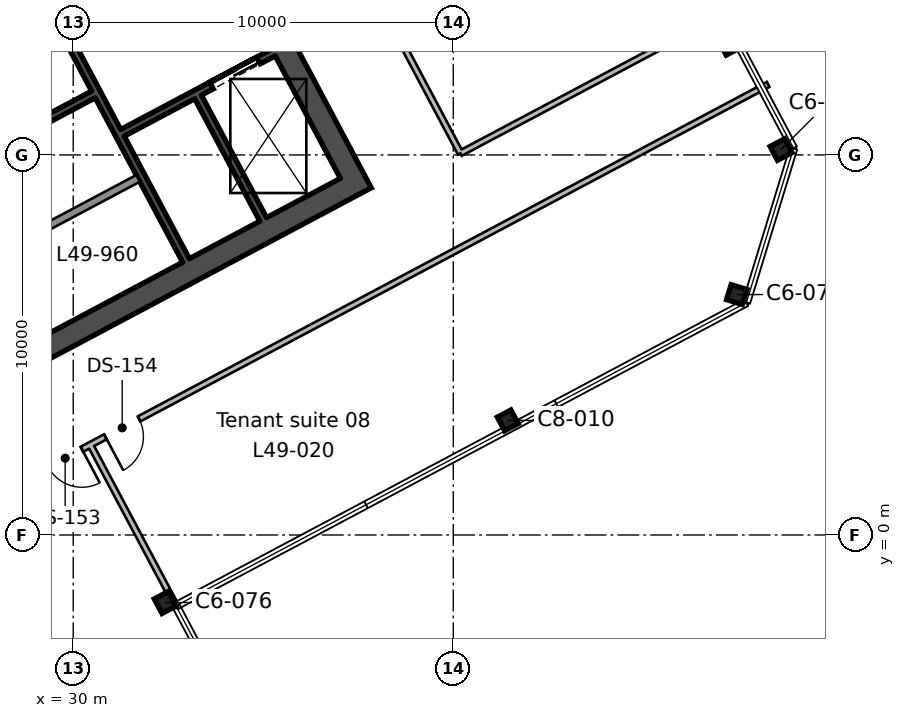
"""IFC4 building model, lengths in metres.
Left out: names, types, materials, properties, quantities, classifications, styles, units other than length and angle.
Written with IfcOpenShell. Run it as: python <this file> out.ifc"""

import sys

from ifc_helpers import new_model, si_unit, direction, frame, frame_2d, origin, origin_2d, place, context, subcontext, project, spatial, rectangle, i_section, extrude, element, fill, save


model = new_model("IFC4")
c1 = context("Model", 3, precision=1e-05, world=origin(), true_north=direction((0.0, 1.0)))
c2 = subcontext(c1, "Body", "Model", "MODEL_VIEW")
j1 = project(units=[si_unit("LENGTHUNIT", "METRE"), si_unit("PLANEANGLEUNIT", "RADIAN")], contexts=[c1])
p1 = place(None, origin())
s1 = spatial("IfcSite", under=j1, at=p1, CompositionType="ELEMENT")
p2 = place(p1, origin())
s2 = spatial("IfcBuilding", under=s1, at=p2, CompositionType="ELEMENT")
p3 = place(p2, frame((0.0, 0.0, 224.7)))
s3 = spatial("IfcBuildingStorey", under=s2, at=p3, CompositionType="ELEMENT", Elevation=224.7)
p4 = place(p3, frame((32.417, -1.777, 0.0), z_axis=(0.0, 0.0, 1.0), x_axis=(0.882947592859, 0.469471562786, 0.0)))
e1 = element("IfcColumn", 1, at=p4, inside=s3, PredefinedType="COLUMN", context=c2, shape_type="SweptSolid", body=[
    extrude(i_section(OverallWidth=0.412, OverallDepth=0.434, WebThickness=0.036, FlangeThickness=0.057, FilletRadius=0.015, at=origin_2d()), origin(), (0.0, 0.0, 1.0), 3.9),
])
p5 = place(p3, frame((41.434, 3.015, 0.0), z_axis=(0.0, 0.0, 1.0), x_axis=(0.882947592859, 0.469471562786, 0.0)))
e2 = element("IfcColumn", 2, at=p5, inside=s3, PredefinedType="COLUMN", context=c2, shape_type="SweptSolid", body=[
    extrude(i_section(OverallWidth=0.404, OverallDepth=0.406, WebThickness=0.027, FlangeThickness=0.044, FilletRadius=0.015, at=origin_2d()), origin(), (0.0, 0.0, 1.0), 3.9),
])
for number, where, z_axis, x_axis in (
    (3, (47.459, 6.326, 0.0), (0.0, 0.0, 1.0), (0.292, 0.956, 0.0)),
    (4, (48.626, 10.142, 0.0), (0.0, 0.0, 1.0), (-0.469, 0.883, 0.0)),
):
    element("IfcColumn", number, at=place(p3, frame(where, z_axis=z_axis, x_axis=x_axis)), inside=s3, PredefinedType="COLUMN", context=c2, shape_type="SweptSolid", body=[
        extrude(i_section(OverallWidth=0.412, OverallDepth=0.434, WebThickness=0.036, FlangeThickness=0.057, FilletRadius=0.015, at=origin_2d()), origin(), (0.0, 0.0, 1.0), 3.9),
    ])
p6 = place(p3, frame((47.266, 12.9, 0.0), z_axis=(0.0, 0.0, 1.0), x_axis=(-0.469471562786, 0.882947592859, 0.0)))
e5 = element("IfcColumn", 5, at=p6, inside=s3, PredefinedType="COLUMN", context=c2, shape_type="SweptSolid", body=[
    extrude(i_section(OverallWidth=0.404, OverallDepth=0.406, WebThickness=0.027, FlangeThickness=0.044, FilletRadius=0.015, at=origin_2d()), origin(), (0.0, 0.0, 1.0), 3.9),
])
p7 = place(p3, frame((37.576, 8.994, 0.0), z_axis=(0.0, 0.0, 1.0), x_axis=(-0.469478769487, 0.88294376095, 0.0)))
e6 = element("IfcWall", 6, at=p7, inside=s3, PredefinedType="SHEAR", context=c2, shape_type="SweptSolid", body=[
    extrude(rectangle(XDim=19.4, YDim=0.6, at=frame_2d((9.7, 0.0))), origin(), (0.0, 0.0, 1.0), 3.9),
])
p8 = place(p7, frame((10.3, 0.0, 0.0)))
e7 = element("IfcOpeningElement", 7, at=p8, cuts=e6, PredefinedType="OPENING", context=c2, shape_type="SweptSolid", body=[
    extrude(rectangle(XDim=2.4, YDim=2.4, at=frame_2d((1.2, 1.2))), frame((0.0, 0.31, 0.0), z_axis=(0.0, -1.0, 0.0), x_axis=(1.0, 0.0, 0.0)), (0.0, 0.0, 1.0), 0.62),
])
p9 = place(p3, frame((19.335, -0.366, 0.0), z_axis=(0.0, 0.0, 1.0), x_axis=(0.88294509198, 0.469476266226, 0.0)))
e8 = element("IfcWall", 8, at=p9, inside=s3, PredefinedType="SHEAR", context=c2, shape_type="SweptSolid", body=[
    extrude(rectangle(XDim=20.2, YDim=0.6, at=frame_2d((10.1, 0.0))), origin(), (0.0, 0.0, 1.0), 3.9),
])
p10 = place(p3, frame((32.968, 7.223, 0.0), z_axis=(0.0, 0.0, 1.0), x_axis=(-0.469480409012, 0.88294288918, 0.0)))
e9 = element("IfcWall", 9, at=p10, inside=s3, PredefinedType="SHEAR", context=c2, shape_type="SweptSolid", body=[
    extrude(rectangle(XDim=7.3, YDim=0.2, at=frame_2d((3.65, 0.0))), origin(), (0.0, 0.0, 1.0), 3.9),
])
p11 = place(p3, frame((34.999, 8.303, 0.0), z_axis=(0.0, 0.0, 1.0), x_axis=(-0.4694665462, 0.882950260207, 0.0)))
e10 = element("IfcWall", 10, at=p11, inside=s3, PredefinedType="SHEAR", context=c2, shape_type="SweptSolid", body=[
    extrude(rectangle(XDim=3.65, YDim=0.2, at=frame_2d((1.825, 0.0))), origin(), (0.0, 0.0, 1.0), 3.9),
])
p12 = place(p3, frame((27.115, 6.942, 0.0), z_axis=(0.0, 0.0, 1.0), x_axis=(0.882934506056, 0.469496174655, 0.0)))
e11 = element("IfcWall", 11, at=p12, inside=s3, PredefinedType="SOLIDWALL", context=c2, shape_type="SweptSolid", body=[
    extrude(rectangle(XDim=5.2, YDim=0.2, at=frame_2d((2.6, 0.0))), origin(), (0.0, 0.0, 1.0), 3.9),
])
p13 = place(p3, frame((31.296, 10.581, 0.0), z_axis=(0.0, 0.0, 1.0), x_axis=(0.882960433586, 0.469447412093, 0.0)))
e12 = element("IfcWall", 12, at=p13, inside=s3, PredefinedType="SHEAR", context=c2, shape_type="SweptSolid", body=[
    extrude(rectangle(XDim=4.5, YDim=0.2, at=frame_2d((2.25, 0.0))), origin(), (0.0, 0.0, 1.0), 3.9),
])
p14 = place(p13, frame((2.65, 0.0, 0.0)))
e13 = element("IfcOpeningElement", 13, at=p14, cuts=e12, PredefinedType="OPENING", context=c2, shape_type="SweptSolid", body=[
    extrude(rectangle(XDim=1.4, YDim=2.4, at=frame_2d((0.7, 1.2))), frame((0.0, 0.11, 0.0), z_axis=(0.0, -1.0, 0.0), x_axis=(1.0, 0.0, 0.0)), (0.0, 0.0, 1.0), 0.22),
])
p15 = place(p3, frame((25.941, 9.15, 0.0), z_axis=(0.0, 0.0, 1.0), x_axis=(0.882953967957, 0.469459572775, 0.0)))
e14 = element("IfcWall", 14, at=p15, inside=s3, PredefinedType="SHEAR", context=c2, shape_type="SweptSolid", body=[
    extrude(rectangle(XDim=5.2, YDim=0.2, at=frame_2d((2.6, 0.0))), origin(), (0.0, 0.0, 1.0), 3.9),
])
p16 = place(p3, frame((24.726, 11.222, 0.0), z_axis=(0.0, 0.0, 1.0), x_axis=(0.882940221191, 0.469485426614, 0.0)))
e15 = element("IfcWall", 15, at=p16, inside=s3, PredefinedType="SHEAR", context=c2, shape_type="SweptSolid", body=[
    extrude(rectangle(XDim=10.0, YDim=0.2, at=frame_2d((5.0, 0.0))), origin(), (0.0, 0.0, 1.0), 3.9),
])
p17 = place(p16, frame((6.3, 0.0, 0.0)))
e16 = element("IfcOpeningElement", 16, at=p17, cuts=e15, PredefinedType="OPENING", context=c2, shape_type="SweptSolid", body=[
    extrude(rectangle(XDim=1.2, YDim=2.1, at=frame_2d((0.6, 1.05))), frame((0.0, 0.11, 0.0), z_axis=(0.0, -1.0, 0.0), x_axis=(1.0, 0.0, 0.0)), (0.0, 0.0, 1.0), 0.22),
])
p18 = place(p16, frame((2.25, 0.0, 0.0)))
e17 = element("IfcOpeningElement", 17, at=p18, cuts=e15, PredefinedType="OPENING", context=c2, shape_type="SweptSolid", body=[
    extrude(rectangle(XDim=0.9, YDim=2.1, at=frame_2d((0.45, 1.05))), frame((0.0, 0.11, 0.0), z_axis=(0.0, -1.0, 0.0), x_axis=(1.0, 0.0, 0.0)), (0.0, 0.0, 1.0), 0.22),
])
p19 = place(p3, frame((48.286, 11.856, 0.0), z_axis=(0.0, 0.0, 1.0), x_axis=(-0.882956748566, -0.469454343001, 0.0)))
e18 = element("IfcWall", 18, at=p19, inside=s3, PredefinedType="PARTITIONING", context=c2, shape_type="SweptSolid", body=[
    extrude(rectangle(XDim=39.284, YDim=0.15, at=frame_2d((19.642, 0.0))), origin(), (0.0, 0.0, 1.0), 3.54),
])
p20 = place(p19, frame((20.45, 0.0, 0.0)))
e19 = element("IfcOpeningElement", 19, at=p20, cuts=e18, PredefinedType="OPENING", context=c2, shape_type="SweptSolid", body=[
    extrude(rectangle(XDim=1.0, YDim=2.1, at=frame_2d((0.5, 1.05))), frame((0.0, 0.085, 0.0), z_axis=(0.0, -1.0, 0.0), x_axis=(1.0, 0.0, 0.0)), (0.0, 0.0, 1.0), 0.17),
])
p21 = place(p19, frame((18.75, 0.0, 0.0)))
e20 = element("IfcOpeningElement", 20, at=p21, cuts=e18, PredefinedType="OPENING", context=c2, shape_type="SweptSolid", body=[
    extrude(rectangle(XDim=1.0, YDim=2.1, at=frame_2d((0.5, 1.05))), frame((0.0, 0.085, 0.0), z_axis=(0.0, -1.0, 0.0), x_axis=(1.0, 0.0, 0.0)), (0.0, 0.0, 1.0), 0.17),
])
p22 = place(p3, frame((30.45, 2.373, 0.0), z_axis=(0.0, 0.0, 1.0), x_axis=(0.469577911111, -0.882891038235, 0.0)))
e21 = element("IfcWall", 21, at=p22, inside=s3, PredefinedType="PARTITIONING", context=c2, shape_type="SweptSolid", body=[
    extrude(rectangle(XDim=5.081, YDim=0.15, at=frame_2d((2.541, 0.0))), origin(), (0.0, 0.0, 1.0), 3.54),
])
p23 = place(p3, frame((30.8, 27.702, 0.0), z_axis=(0.0, 0.0, 1.0), x_axis=(0.469451816494, -0.882958091865, 0.0)))
e22 = element("IfcWall", 22, at=p23, inside=s3, PredefinedType="PARTITIONING", context=c2, shape_type="SweptSolid", body=[
    extrude(rectangle(XDim=20.0, YDim=0.15, at=frame_2d((10.0, 0.0))), origin(), (0.0, 0.0, 1.0), 3.54),
])
p24 = place(p3, frame((40.189, 10.043, 0.0), z_axis=(0.0, 0.0, 1.0), x_axis=(0.882991619958, 0.469388750487, 0.0)))
e23 = element("IfcWall", 23, at=p24, inside=s3, PredefinedType="PARTITIONING", context=c2, shape_type="SweptSolid", body=[
    extrude(rectangle(XDim=8.0, YDim=0.15, at=frame_2d((4.0, 0.0))), origin(), (0.0, 0.0, 1.0), 3.54),
])
p25 = place(p14, origin())
e24 = element("IfcDoor", 24, at=p25, inside=s3, OperationType="DOUBLE_DOOR_SLIDING", PredefinedType="DOOR", context=c2, shape_type="SweptSolid", body=[
    extrude(rectangle(XDim=1.4, YDim=2.4, at=frame_2d((0.7, 1.2))), frame((0.0, 0.025, 0.0), z_axis=(0.0, -1.0, 0.0), x_axis=(1.0, 0.0, 0.0)), (0.0, 0.0, 1.0), 0.05),
])
fill(e13, e24)
p26 = place(p20, origin())
e25 = element("IfcDoor", 25, at=p26, inside=s3, OperationType="SINGLE_SWING_LEFT", PredefinedType="DOOR", context=c2, shape_type="SweptSolid", body=[
    extrude(rectangle(XDim=1.0, YDim=2.1, at=frame_2d((0.5, 1.05))), frame((0.0, 0.025, 0.0), z_axis=(0.0, -1.0, 0.0), x_axis=(1.0, 0.0, 0.0)), (0.0, 0.0, 1.0), 0.05),
])
fill(e19, e25)
p27 = place(p21, origin())
e26 = element("IfcDoor", 26, at=p27, inside=s3, OperationType="SINGLE_SWING_RIGHT", PredefinedType="DOOR", context=c2, shape_type="SweptSolid", body=[
    extrude(rectangle(XDim=1.0, YDim=2.1, at=frame_2d((0.5, 1.05))), frame((0.0, 0.025, 0.0), z_axis=(0.0, -1.0, 0.0), x_axis=(1.0, 0.0, 0.0)), (0.0, 0.0, 1.0), 0.05),
])
fill(e20, e26)
save(model, sys.argv[1])
